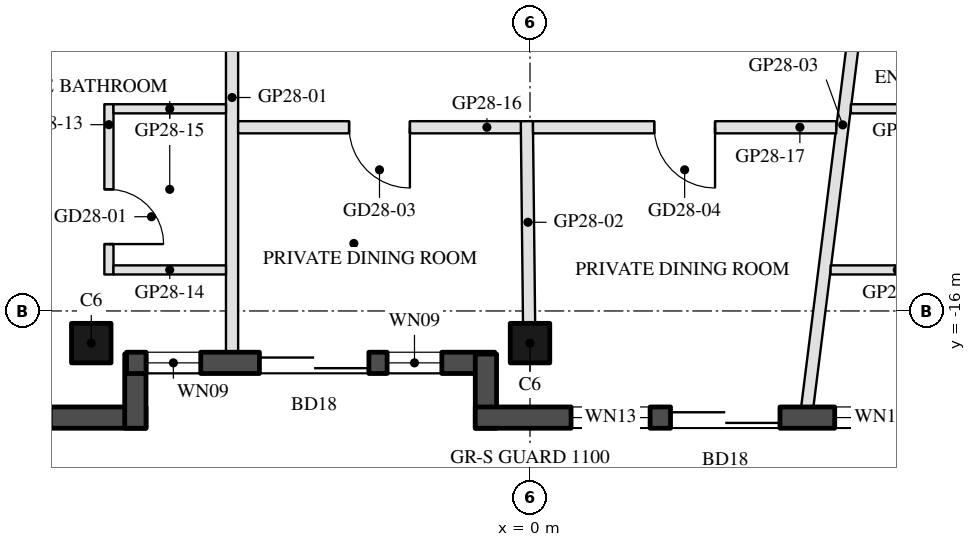
"""IFC4 building model, lengths in metres.
Left out: names, types, materials, properties, quantities, classifications, styles, units other than length and angle.
Written with IfcOpenShell. Run it as: python <this file> out.ifc"""

import sys

from ifc_helpers import new_model, si_unit, direction, frame, frame_2d, origin, origin_2d, place, context, subcontext, project, spatial, rectangle, hollow_rectangle, extrude, boolean, halfspace, element, fill, save


model = new_model("IFC4")
c1 = context("Model", 3, precision=1e-05, world=origin(), true_north=direction((0.0, 1.0)))
c2 = subcontext(c1, "Body", "Model", "MODEL_VIEW")
j1 = project(units=[si_unit("LENGTHUNIT", "METRE"), si_unit("PLANEANGLEUNIT", "RADIAN")], contexts=[c1])
p1 = place(None, origin())
s1 = spatial("IfcSite", under=j1, at=p1, CompositionType="ELEMENT")
p2 = place(p1, origin())
s2 = spatial("IfcBuilding", under=s1, at=p2, CompositionType="ELEMENT")
p3 = place(p2, frame((0.0, 0.0, 280.0)))
s3 = spatial("IfcBuildingStorey", under=s2, at=p3, CompositionType="ELEMENT", Elevation=280.0)
p4 = place(p3, frame((-7.215, -16.529, 0.0), z_axis=(0.0, 0.0, 1.0), x_axis=(-1.0, 0.0, 0.0)))
e1 = element("IfcColumn", 1, at=p4, inside=s3, PredefinedType="COLUMN", context=c2, shape_type="SweptSolid", body=[
    boolean("DIFFERENCE", extrude(hollow_rectangle(XDim=0.65, YDim=0.65, WallThickness=0.03, at=origin_2d()), origin(), (0.0, 0.0, 1.0), 3.7), halfspace(frame((0.0, 0.0, 0.04), z_axis=(0.0, 0.0, 1.0), x_axis=(1.0, 0.0, 0.0)), True)),
])
p5 = place(p3, frame((0.0, -16.529, 0.0), z_axis=(0.0, 0.0, 1.0), x_axis=(-1.0, 0.0, 0.0)))
e2 = element("IfcColumn", 2, at=p5, inside=s3, PredefinedType="COLUMN", context=c2, shape_type="SweptSolid", body=[
    boolean("DIFFERENCE", extrude(hollow_rectangle(XDim=0.65, YDim=0.65, WallThickness=0.03, at=origin_2d()), origin(), (0.0, 0.0, 1.0), 3.7), halfspace(frame((0.0, 0.0, 0.037), z_axis=(0.0, 0.0, 1.0), x_axis=(1.0, 0.0, 0.0)), True)),
])
p6 = place(p3, frame((-17.185, -17.754, 0.0), z_axis=(0.0, 0.0, 1.0), x_axis=(1.0, 0.0, 0.0)))
e3 = element("IfcWall", 3, at=p6, inside=s3, PredefinedType="SOLIDWALL", context=c2, shape_type="SweptSolid", body=[
    extrude(rectangle(XDim=10.87, YDim=0.35, at=frame_2d((5.435, 0.0))), origin(), (0.0, 0.0, 1.0), 3.55),
])
p7 = place(p6, frame((0.381, 0.0, 0.3)))
e4 = element("IfcOpeningElement", 4, at=p7, cuts=e3, PredefinedType="OPENING", context=c2, shape_type="SweptSolid", body=[
    extrude(rectangle(XDim=1.6, YDim=2.65, at=frame_2d((0.8, 1.325))), frame((0.0, 0.185, 0.0), z_axis=(0.0, -1.0, 0.0), x_axis=(1.0, 0.0, 0.0)), (0.0, 0.0, 1.0), 0.37),
])
p8 = place(p6, frame((6.895, 0.0, 0.0)))
e5 = element("IfcOpeningElement", 5, at=p8, cuts=e3, PredefinedType="OPENING", context=c2, shape_type="SweptSolid", body=[
    extrude(rectangle(XDim=2.4, YDim=2.4, at=frame_2d((1.2, 1.2))), frame((0.0, 0.185, 0.0), z_axis=(0.0, -1.0, 0.0), x_axis=(1.0, 0.0, 0.0)), (0.0, 0.0, 1.0), 0.37),
])
p9 = place(p6, frame((3.43, 0.0, 0.3)))
e6 = element("IfcOpeningElement", 6, at=p9, cuts=e3, PredefinedType="OPENING", context=c2, shape_type="SweptSolid", body=[
    extrude(rectangle(XDim=3.1, YDim=2.65, at=frame_2d((1.55, 1.325))), frame((0.0, 0.185, 0.0), z_axis=(0.0, -1.0, 0.0), x_axis=(1.0, 0.0, 0.0)), (0.0, 0.0, 1.0), 0.37),
])
p10 = place(p3, frame((-6.49, -17.929, 0.0), z_axis=(0.0, 0.0, 1.0), x_axis=(0.0, 1.0, 0.0)))
e7 = element("IfcWall", 7, at=p10, inside=s3, PredefinedType="SOLIDWALL", context=c2, shape_type="SweptSolid", body=[
    extrude(rectangle(XDim=1.22, YDim=0.35, at=frame_2d((0.61, 0.0))), origin(), (0.0, 0.0, 1.0), 3.55),
])
p11 = place(p3, frame((-6.635, -16.854, 0.0), z_axis=(0.0, 0.0, 1.0), x_axis=(1.0, 0.0, 0.0)))
e8 = element("IfcWall", 8, at=p11, inside=s3, PredefinedType="SOLIDWALL", context=c2, shape_type="SweptSolid", body=[
    extrude(rectangle(XDim=6.055, YDim=0.35, at=frame_2d((3.028, 0.0))), origin(), (0.0, 0.0, 1.0), 3.55),
])
p12 = place(p11, frame((0.32, 0.0, 0.3)))
e9 = element("IfcOpeningElement", 9, at=p12, cuts=e8, PredefinedType="OPENING", context=c2, shape_type="SweptSolid", body=[
    extrude(rectangle(XDim=0.9, YDim=2.65, at=frame_2d((0.45, 1.325))), frame((0.0, 0.185, 0.0), z_axis=(0.0, -1.0, 0.0), x_axis=(1.0, 0.0, 0.0)), (0.0, 0.0, 1.0), 0.37),
])
p13 = place(p11, frame((2.186, 0.0, 0.0)))
e10 = element("IfcOpeningElement", 10, at=p13, cuts=e8, PredefinedType="OPENING", context=c2, shape_type="SweptSolid", body=[
    extrude(rectangle(XDim=1.8, YDim=2.4, at=frame_2d((0.9, 1.2))), frame((0.0, 0.185, 0.0), z_axis=(0.0, -1.0, 0.0), x_axis=(1.0, 0.0, 0.0)), (0.0, 0.0, 1.0), 0.37),
])
p14 = place(p11, frame((4.285, 0.0, 0.3)))
e11 = element("IfcOpeningElement", 11, at=p14, cuts=e8, PredefinedType="OPENING", context=c2, shape_type="SweptSolid", body=[
    extrude(rectangle(XDim=0.9, YDim=2.65, at=frame_2d((0.45, 1.325))), frame((0.0, 0.185, 0.0), z_axis=(0.0, -1.0, 0.0), x_axis=(1.0, 0.0, 0.0)), (0.0, 0.0, 1.0), 0.37),
])
p15 = place(p3, frame((-0.725, -16.709, 0.0), z_axis=(0.0, 0.0, 1.0), x_axis=(0.0, -1.0, 0.0)))
e12 = element("IfcWall", 12, at=p15, inside=s3, PredefinedType="SOLIDWALL", context=c2, shape_type="SweptSolid", body=[
    extrude(rectangle(XDim=1.22, YDim=0.35, at=frame_2d((0.61, 0.0))), origin(), (0.0, 0.0, 1.0), 3.55),
])
p16 = place(p3, frame((-0.9, -17.754, 0.0), z_axis=(0.0, 0.0, 1.0), x_axis=(1.0, 0.0, 0.0)))
e13 = element("IfcWall", 13, at=p16, inside=s3, PredefinedType="SOLIDWALL", context=c2, shape_type="SweptSolid", body=[
    extrude(rectangle(XDim=9.015, YDim=0.35, at=frame_2d((4.508, 0.0))), origin(), (0.0, 0.0, 1.0), 3.55),
])
p17 = place(p16, frame((3.211, 0.0, 0.0)))
e14 = element("IfcOpeningElement", 14, at=p17, cuts=e13, PredefinedType="OPENING", context=c2, shape_type="SweptSolid", body=[
    extrude(rectangle(XDim=1.8, YDim=2.4, at=frame_2d((0.9, 1.2))), frame((0.0, 0.185, 0.0), z_axis=(0.0, -1.0, 0.0), x_axis=(1.0, 0.0, 0.0)), (0.0, 0.0, 1.0), 0.37),
])
p18 = place(p16, frame((1.575, 0.0, 0.3)))
e15 = element("IfcOpeningElement", 15, at=p18, cuts=e13, PredefinedType="OPENING", context=c2, shape_type="SweptSolid", body=[
    extrude(rectangle(XDim=1.3, YDim=2.65, at=frame_2d((0.65, 1.325))), frame((0.0, 0.185, 0.0), z_axis=(0.0, -1.0, 0.0), x_axis=(1.0, 0.0, 0.0)), (0.0, 0.0, 1.0), 0.37),
])
p19 = place(p16, frame((5.911, 0.0, 0.3)))
e16 = element("IfcOpeningElement", 16, at=p19, cuts=e13, PredefinedType="OPENING", context=c2, shape_type="SweptSolid", body=[
    extrude(rectangle(XDim=1.5, YDim=2.65, at=frame_2d((0.75, 1.325))), frame((0.0, 0.185, 0.0), z_axis=(0.0, -1.0, 0.0), x_axis=(1.0, 0.0, 0.0)), (0.0, 0.0, 1.0), 0.37),
])
p20 = place(p3, frame((-4.9, -16.679, 0.0), z_axis=(0.0, 0.0, 1.0), x_axis=(0.0, 1.0, 0.0)))
e17 = element("IfcWall", 17, at=p20, inside=s3, PredefinedType="PARTITIONING", context=c2, shape_type="SweptSolid", body=[
    extrude(rectangle(XDim=8.379, YDim=0.2, at=frame_2d((4.189, 0.0))), origin(), (0.0, 0.0, 1.0), 3.16),
])
p21 = place(p3, frame((-0.015, -16.204, 0.0), z_axis=(0.0, 0.0, 1.0), x_axis=(-0.011013356537, 0.99993935115, 0.0)))
e18 = element("IfcWall", 18, at=p21, inside=s3, PredefinedType="PARTITIONING", context=c2, shape_type="SweptSolid", body=[
    extrude(rectangle(XDim=3.325, YDim=0.2, at=frame_2d((1.663, 0.0))), origin(), (0.0, 0.0, 1.0), 3.05),
])
p22 = place(p3, frame((4.56, -17.579, 0.0), z_axis=(0.0, 0.0, 1.0), x_axis=(0.124584174438, 0.992209042228, 0.0)))
e19 = element("IfcWall", 19, at=p22, inside=s3, PredefinedType="PARTITIONING", context=c2, shape_type="SweptSolid", body=[
    extrude(rectangle(XDim=9.351, YDim=0.2, at=frame_2d((4.676, 0.0))), origin(), (0.0, 0.0, 1.0), 3.16),
])
p23 = place(p3, frame((-6.925, -12.6, 0.0), z_axis=(0.0, 0.0, 1.0), x_axis=(0.0, -1.0, 0.0)))
e20 = element("IfcWall", 20, at=p23, inside=s3, PredefinedType="PARTITIONING", context=c2, shape_type="SweptSolid", body=[
    extrude(rectangle(XDim=2.8, YDim=0.15, at=frame_2d((1.4, 0.0))), origin(), (0.0, 0.0, 1.0), 3.55),
])
p24 = place(p23, frame((1.4, 0.0, 0.0)))
e21 = element("IfcOpeningElement", 21, at=p24, cuts=e20, PredefinedType="OPENING", context=c2, shape_type="SweptSolid", body=[
    extrude(rectangle(XDim=0.9, YDim=2.1, at=frame_2d((0.45, 1.05))), frame((0.0, 0.085, 0.0), z_axis=(0.0, -1.0, 0.0), x_axis=(1.0, 0.0, 0.0)), (0.0, 0.0, 1.0), 0.17),
])
for number, where, z_axis, x_axis in (
    (22, (-6.85, -15.325, 0.0), (0.0, 0.0, 1.0), (1.0, 0.0, 0.0)),
    (23, (-6.85, -12.675, 0.0), (0.0, 0.0, 1.0), (1.0, 0.0, 0.0)),
):
    element("IfcWall", number, at=place(p3, frame(where, z_axis=z_axis, x_axis=x_axis)), inside=s3, PredefinedType="PARTITIONING", context=c2, shape_type="SweptSolid", body=[
        extrude(rectangle(XDim=1.85, YDim=0.15, at=frame_2d((0.925, 0.0))), origin(), (0.0, 0.0, 1.0), 3.55),
    ])
p25 = place(p3, frame((-0.151, -12.979, 0.0), z_axis=(0.0, 0.0, 1.0), x_axis=(-1.0, 0.0, 0.0)))
e24 = element("IfcWall", 24, at=p25, inside=s3, PredefinedType="PARTITIONING", context=c2, shape_type="SweptSolid", body=[
    extrude(rectangle(XDim=4.649, YDim=0.2, at=frame_2d((2.325, 0.0))), origin(), (0.0, 0.0, 1.0), 3.05),
])
p26 = place(p25, frame((1.825, 0.0, 0.0)))
e25 = element("IfcOpeningElement", 25, at=p26, cuts=e24, PredefinedType="OPENING", context=c2, shape_type="SweptSolid", body=[
    extrude(rectangle(XDim=1.0, YDim=2.1, at=frame_2d((0.5, 1.05))), frame((0.0, 0.11, 0.0), z_axis=(0.0, -1.0, 0.0), x_axis=(1.0, 0.0, 0.0)), (0.0, 0.0, 1.0), 0.22),
])
p27 = place(p3, frame((5.037, -12.979, 0.0), z_axis=(0.0, 0.0, 1.0), x_axis=(-1.0, 0.0, 0.0)))
e26 = element("IfcWall", 26, at=p27, inside=s3, PredefinedType="PARTITIONING", context=c2, shape_type="SweptSolid", body=[
    extrude(rectangle(XDim=4.988, YDim=0.2, at=frame_2d((2.494, 0.0))), origin(), (0.0, 0.0, 1.0), 3.05),
])
p28 = place(p27, frame((1.994, 0.0, 0.0)))
e27 = element("IfcOpeningElement", 27, at=p28, cuts=e26, PredefinedType="OPENING", context=c2, shape_type="SweptSolid", body=[
    extrude(rectangle(XDim=1.0, YDim=2.1, at=frame_2d((0.5, 1.05))), frame((0.0, 0.11, 0.0), z_axis=(0.0, -1.0, 0.0), x_axis=(1.0, 0.0, 0.0)), (0.0, 0.0, 1.0), 0.22),
])
p29 = place(p3, frame((4.944, -15.325, 0.0), z_axis=(0.0, 0.0, 1.0), x_axis=(1.0, 0.0, 0.0)))
e28 = element("IfcWall", 28, at=p29, inside=s3, PredefinedType="PARTITIONING", context=c2, shape_type="SweptSolid", body=[
    extrude(rectangle(XDim=2.192, YDim=0.15, at=frame_2d((1.096, 0.0))), origin(), (0.0, 0.0, 1.0), 3.05),
])
p30 = place(p3, frame((5.277, -12.675, 0.0), z_axis=(0.0, 0.0, 1.0), x_axis=(1.0, 0.0, 0.0)))
e29 = element("IfcWall", 29, at=p30, inside=s3, PredefinedType="PARTITIONING", context=c2, shape_type="SweptSolid", body=[
    extrude(rectangle(XDim=1.859, YDim=0.15, at=frame_2d((0.93, 0.0))), origin(), (0.0, 0.0, 1.0), 3.05),
])
p31 = place(p12, origin())
e30 = element("IfcWindow", 30, at=p31, inside=s3, PartitioningType="SINGLE_PANEL", PredefinedType="WINDOW", context=c2, shape_type="SweptSolid", body=[
    extrude(rectangle(XDim=0.9, YDim=2.65, at=frame_2d((0.45, 1.325))), frame((0.0, 0.03, 0.0), z_axis=(0.0, -1.0, 0.0), x_axis=(1.0, 0.0, 0.0)), (0.0, 0.0, 1.0), 0.06),
])
fill(e9, e30)
p32 = place(p13, frame((1.8, 0.0, 0.0), z_axis=(0.0, 0.0, 1.0), x_axis=(-1.0, 0.0, 0.0)))
e31 = element("IfcDoor", 31, at=p32, inside=s3, OperationType="SLIDING_TO_LEFT", PredefinedType="DOOR", context=c2, shape_type="SweptSolid", body=[
    extrude(rectangle(XDim=1.8, YDim=2.4, at=frame_2d((0.9, 1.2))), frame((0.0, 0.025, 0.0), z_axis=(0.0, -1.0, 0.0), x_axis=(1.0, 0.0, 0.0)), (0.0, 0.0, 1.0), 0.05),
])
fill(e10, e31)
p33 = place(p14, origin())
e32 = element("IfcWindow", 32, at=p33, inside=s3, PartitioningType="SINGLE_PANEL", PredefinedType="WINDOW", context=c2, shape_type="SweptSolid", body=[
    extrude(rectangle(XDim=0.9, YDim=2.65, at=frame_2d((0.45, 1.325))), frame((0.0, 0.03, 0.0), z_axis=(0.0, -1.0, 0.0), x_axis=(1.0, 0.0, 0.0)), (0.0, 0.0, 1.0), 0.06),
])
fill(e11, e32)
p34 = place(p17, frame((1.8, 0.0, 0.0), z_axis=(0.0, 0.0, 1.0), x_axis=(-1.0, 0.0, 0.0)))
e33 = element("IfcDoor", 33, at=p34, inside=s3, OperationType="SLIDING_TO_LEFT", PredefinedType="DOOR", context=c2, shape_type="SweptSolid", body=[
    extrude(rectangle(XDim=1.8, YDim=2.4, at=frame_2d((0.9, 1.2))), frame((0.0, 0.025, 0.0), z_axis=(0.0, -1.0, 0.0), x_axis=(1.0, 0.0, 0.0)), (0.0, 0.0, 1.0), 0.05),
])
fill(e14, e33)
p35 = place(p18, origin())
e34 = element("IfcWindow", 34, at=p35, inside=s3, PartitioningType="SINGLE_PANEL", PredefinedType="WINDOW", context=c2, shape_type="SweptSolid", body=[
    extrude(rectangle(XDim=1.3, YDim=2.65, at=frame_2d((0.65, 1.325))), frame((0.0, 0.03, 0.0), z_axis=(0.0, -1.0, 0.0), x_axis=(1.0, 0.0, 0.0)), (0.0, 0.0, 1.0), 0.06),
])
fill(e15, e34)
p36 = place(p19, origin())
e35 = element("IfcWindow", 35, at=p36, inside=s3, PartitioningType="SINGLE_PANEL", PredefinedType="WINDOW", context=c2, shape_type="SweptSolid", body=[
    extrude(rectangle(XDim=1.5, YDim=2.65, at=frame_2d((0.75, 1.325))), frame((0.0, 0.03, 0.0), z_axis=(0.0, -1.0, 0.0), x_axis=(1.0, 0.0, 0.0)), (0.0, 0.0, 1.0), 0.06),
])
fill(e16, e35)
p37 = place(p24, origin())
e36 = element("IfcDoor", 36, at=p37, inside=s3, OperationType="SINGLE_SWING_RIGHT", PredefinedType="DOOR", context=c2, shape_type="SweptSolid", body=[
    extrude(rectangle(XDim=0.9, YDim=2.1, at=frame_2d((0.45, 1.05))), frame((0.0, 0.025, 0.0), z_axis=(0.0, -1.0, 0.0), x_axis=(1.0, 0.0, 0.0)), (0.0, 0.0, 1.0), 0.05),
])
fill(e21, e36)
p38 = place(p26, origin())
e37 = element("IfcDoor", 37, at=p38, inside=s3, OperationType="SINGLE_SWING_LEFT", PredefinedType="DOOR", context=c2, shape_type="SweptSolid", body=[
    extrude(rectangle(XDim=1.0, YDim=2.1, at=frame_2d((0.5, 1.05))), frame((0.0, 0.025, 0.0), z_axis=(0.0, -1.0, 0.0), x_axis=(1.0, 0.0, 0.0)), (0.0, 0.0, 1.0), 0.05),
])
fill(e25, e37)
p39 = place(p28, origin())
e38 = element("IfcDoor", 38, at=p39, inside=s3, OperationType="SINGLE_SWING_LEFT", PredefinedType="DOOR", context=c2, shape_type="SweptSolid", body=[
    extrude(rectangle(XDim=1.0, YDim=2.1, at=frame_2d((0.5, 1.05))), frame((0.0, 0.025, 0.0), z_axis=(0.0, -1.0, 0.0), x_axis=(1.0, 0.0, 0.0)), (0.0, 0.0, 1.0), 0.05),
])
fill(e27, e38)
save(model, sys.argv[1])
